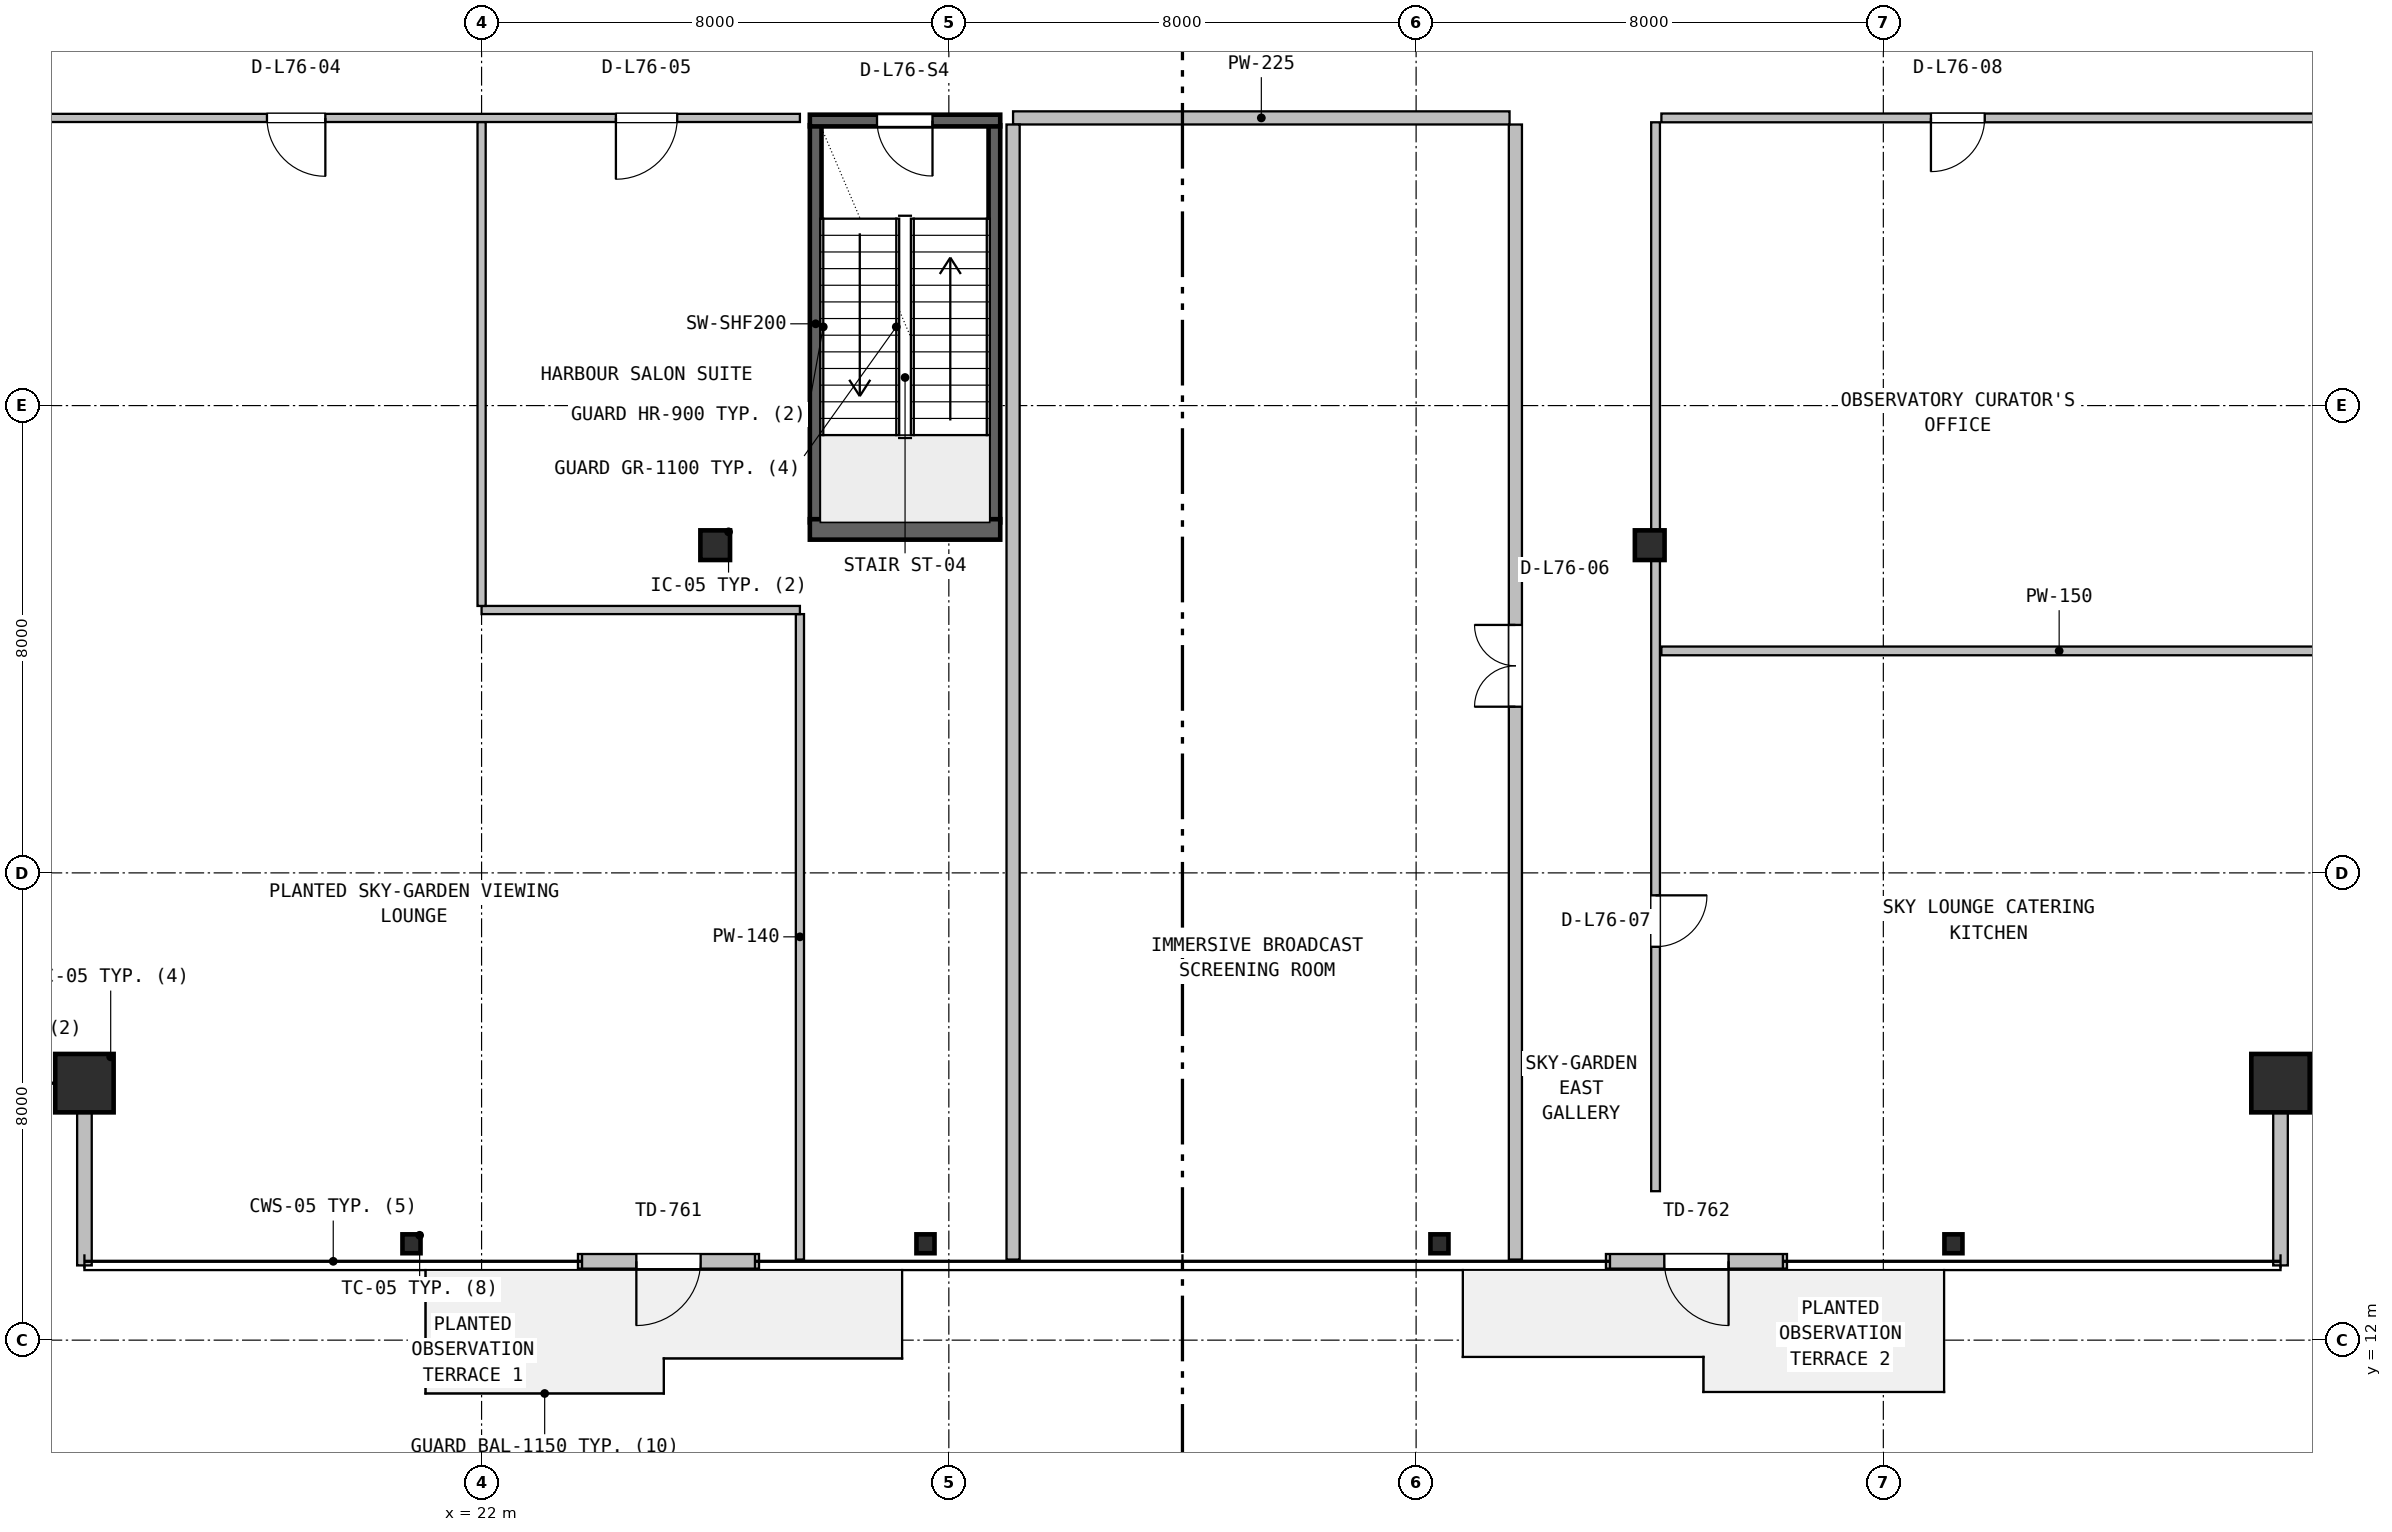
"""IFC4 building model, lengths in metres.
Left out: names, types, materials, properties, quantities, classifications, styles, units other than length and angle.
Written with IfcOpenShell. Run it as: python <this file> out.ifc"""

import sys

from ifc_helpers import new_model, si_unit, direction, frame, frame_2d, origin, origin_2d, place, context, subcontext, project, spatial, rectangle, hollow_rectangle, hollow_circle, i_section, extrude, source, transform, mapped, element, fill, save


model = new_model("IFC4")
c1 = context("Model", 3, precision=1e-05, world=origin(), true_north=direction((0.0, 1.0)))
c2 = subcontext(c1, "Body", "Model", "MODEL_VIEW")
j1 = project(units=[si_unit("LENGTHUNIT", "METRE"), si_unit("PLANEANGLEUNIT", "RADIAN")], contexts=[c1])
p1 = place(None, origin())
s1 = spatial("IfcSite", under=j1, at=p1, CompositionType="ELEMENT")
p2 = place(p1, origin())
s2 = spatial("IfcBuilding", under=s1, at=p2, CompositionType="ELEMENT")
p3 = place(p2, frame((0.0, 0.0, 305.0)))
s3 = spatial("IfcBuildingStorey", under=s2, at=p3, CompositionType="ELEMENT", Elevation=305.0)
m1 = source(origin(), c2, "Body", "SweptSolid", [
    extrude(hollow_rectangle(XDim=1.0, YDim=1.0, WallThickness=0.04, at=origin_2d()), origin(), (0.0, 0.0, 1.0), 4.8),
])
for number, where, z_axis, x_axis in (
    (1, (15.2, 16.4, 0.0), (0.0, 0.0, 1.0), (1.0, 0.0, 0.0)),
    (2, (52.8, 16.4, 0.0), (0.0, 0.0, 1.0), (1.0, 0.0, 0.0)),
):
    element("IfcColumn", number, at=place(p3, frame(where, z_axis=z_axis, x_axis=x_axis)), inside=s3, PredefinedType="COLUMN", context=c2, shape_type="MappedRepresentation", body=[
        mapped(m1, transform((0.0, 0.0, 0.0), x_axis=(1.0, 0.0, 0.0), y_axis=(0.0, 1.0, 0.0), z_axis=(0.0, 0.0, 1.0), scale=1.0)),
    ])
m2 = source(origin(), c2, "Body", "SweptSolid", [
    extrude(i_section(OverallWidth=0.309, OverallDepth=0.323, WebThickness=0.014, FlangeThickness=0.023, FilletRadius=0.015, at=origin_2d()), origin(), (0.0, 0.0, 1.0), 4.8),
])
for number, where, z_axis, x_axis in (
    (3, (20.8, 13.65, 0.0), (0.0, 0.0, 1.0), (1.0, 0.0, 0.0)),
    (4, (29.6, 13.65, 0.0), (0.0, 0.0, 1.0), (1.0, 0.0, 0.0)),
    (5, (38.4, 13.65, 0.0), (0.0, 0.0, 1.0), (1.0, 0.0, 0.0)),
    (6, (47.2, 13.65, 0.0), (0.0, 0.0, 1.0), (1.0, 0.0, 0.0)),
):
    element("IfcColumn", number, at=place(p3, frame(where, z_axis=z_axis, x_axis=x_axis)), inside=s3, PredefinedType="COLUMN", context=c2, shape_type="MappedRepresentation", body=[
        mapped(m2, transform((0.0, 0.0, 0.0), x_axis=(1.0, 0.0, 0.0), y_axis=(0.0, 1.0, 0.0), z_axis=(0.0, 0.0, 1.0), scale=1.0)),
    ])
m3 = source(origin(), c2, "Body", "SweptSolid", [
    extrude(hollow_circle(Radius=0.254, WallThickness=0.02, at=origin_2d()), origin(), (0.0, 0.0, 1.0), 4.8),
])
for number, where, z_axis, x_axis in (
    (7, (26.0, 25.61, 0.0), (0.0, 0.0, 1.0), (1.0, 0.0, 0.0)),
    (8, (42.0, 25.61, 0.0), (0.0, 0.0, 1.0), (1.0, 0.0, 0.0)),
):
    element("IfcColumn", number, at=place(p3, frame(where, z_axis=z_axis, x_axis=x_axis)), inside=s3, PredefinedType="COLUMN", context=c2, shape_type="MappedRepresentation", body=[
        mapped(m3, transform((0.0, 0.0, 0.0), x_axis=(1.0, 0.0, 0.0), y_axis=(0.0, 1.0, 0.0), z_axis=(0.0, 0.0, 1.0), scale=1.0)),
    ])
p4 = place(p3, frame((23.65, 13.35, 0.0), z_axis=(0.0, 0.0, 1.0), x_axis=(1.0, 0.0, 0.0)))
e9 = element("IfcWall", 9, at=p4, inside=s3, PredefinedType="SOLIDWALL", context=c2, shape_type="SweptSolid", body=[
    extrude(rectangle(XDim=3.1, YDim=0.25, at=frame_2d((1.55, 0.0))), origin(), (0.0, 0.0, 1.0), 4.5),
])
p5 = place(p4, frame((1.0, 0.0, 0.0)))
e10 = element("IfcOpeningElement", 10, at=p5, cuts=e9, PredefinedType="OPENING", context=c2, shape_type="SweptSolid", body=[
    extrude(rectangle(XDim=1.1, YDim=2.15, at=frame_2d((0.55, 1.075))), frame((0.0, 0.135, 0.0), z_axis=(0.0, -1.0, 0.0), x_axis=(1.0, 0.0, 0.0)), (0.0, 0.0, 1.0), 0.27),
])
p6 = place(p3, frame((41.25, 13.35, 0.0), z_axis=(0.0, 0.0, 1.0), x_axis=(1.0, 0.0, 0.0)))
e11 = element("IfcWall", 11, at=p6, inside=s3, PredefinedType="SOLIDWALL", context=c2, shape_type="SweptSolid", body=[
    extrude(rectangle(XDim=3.1, YDim=0.25, at=frame_2d((1.55, 0.0))), origin(), (0.0, 0.0, 1.0), 4.5),
])
p7 = place(p6, frame((1.0, 0.0, 0.0)))
e12 = element("IfcOpeningElement", 12, at=p7, cuts=e11, PredefinedType="OPENING", context=c2, shape_type="SweptSolid", body=[
    extrude(rectangle(XDim=1.1, YDim=2.15, at=frame_2d((0.55, 1.075))), frame((0.0, 0.135, 0.0), z_axis=(0.0, -1.0, 0.0), x_axis=(1.0, 0.0, 0.0)), (0.0, 0.0, 1.0), 0.27),
])
for number, where, z_axis, x_axis in (
    (13, (15.2, 13.28, 0.0), (0.0, 0.0, 1.0), (0.0, 1.0, 0.0)),
    (14, (52.8, 13.28, 0.0), (0.0, 0.0, 1.0), (0.0, 1.0, 0.0)),
):
    element("IfcWall", number, at=place(p3, frame(where, z_axis=z_axis, x_axis=x_axis)), inside=s3, PredefinedType="SOLIDWALL", context=c2, shape_type="SweptSolid", body=[
        extrude(rectangle(XDim=3.2, YDim=0.25, at=frame_2d((1.6, 0.0))), origin(), (0.0, 0.0, 1.0), 4.141),
    ])
for number, where, z_axis, x_axis in (
    (15, (27.72, 26.0, 0.0), (0.0, 0.0, 1.0), (0.0, 1.0, 0.0)),
    (16, (30.78, 26.0, 0.0), (0.0, 0.0, 1.0), (0.0, 1.0, 0.0)),
):
    element("IfcWall", number, at=place(p3, frame(where, z_axis=z_axis, x_axis=x_axis)), inside=s3, PredefinedType="SHEAR", context=c2, shape_type="SweptSolid", body=[
        extrude(rectangle(XDim=6.8, YDim=0.2, at=frame_2d((3.4, 0.0))), origin(), (0.0, 0.0, 1.0), 4.52),
    ])
p8 = place(p3, frame((27.62, 25.88, 0.0), z_axis=(0.0, 0.0, 1.0), x_axis=(1.0, 0.0, 0.0)))
e17 = element("IfcWall", 17, at=p8, inside=s3, PredefinedType="SHEAR", context=c2, shape_type="SweptSolid", body=[
    extrude(rectangle(XDim=3.26, YDim=0.35, at=frame_2d((1.63, 0.0))), origin(), (0.0, 0.0, 1.0), 4.52),
])
p9 = place(p3, frame((27.62, 32.88, 0.0), z_axis=(0.0, 0.0, 1.0), x_axis=(1.0, 0.0, 0.0)))
e18 = element("IfcWall", 18, at=p9, inside=s3, PredefinedType="SHEAR", context=c2, shape_type="SweptSolid", body=[
    extrude(rectangle(XDim=3.26, YDim=0.2, at=frame_2d((1.63, 0.0))), origin(), (0.0, 0.0, 1.0), 4.52),
])
p10 = place(p9, frame((1.15, 0.0, 0.0)))
e19 = element("IfcOpeningElement", 19, at=p10, cuts=e18, PredefinedType="OPENING", context=c2, shape_type="SweptSolid", body=[
    extrude(rectangle(XDim=0.95, YDim=2.1, at=frame_2d((0.475, 1.05))), frame((0.0, 0.11, 0.0), z_axis=(0.0, -1.0, 0.0), x_axis=(1.0, 0.0, 0.0)), (0.0, 0.0, 1.0), 0.22),
])
p11 = place(p3, frame((27.45, 13.38, 0.0), z_axis=(0.0, 0.0, 1.0), x_axis=(0.0, 1.0, 0.0)))
e20 = element("IfcWall", 20, at=p11, inside=s3, PredefinedType="PARTITIONING", context=c2, shape_type="SweptSolid", body=[
    extrude(rectangle(XDim=11.05, YDim=0.14, at=frame_2d((5.525, 0.0))), origin(), (0.0, 0.0, 1.0), 3.951),
])
p12 = place(p3, frame((22.0, 24.5, 0.0), z_axis=(0.0, 0.0, 1.0), x_axis=(1.0, 0.0, 0.0)))
e21 = element("IfcWall", 21, at=p12, inside=s3, PredefinedType="PARTITIONING", context=c2, shape_type="SweptSolid", body=[
    extrude(rectangle(XDim=5.45, YDim=0.14, at=frame_2d((2.725, 0.0))), origin(), (0.0, 0.0, 1.0), 3.951),
])
p13 = place(p3, frame((22.0, 24.57, 0.0), z_axis=(0.0, 0.0, 1.0), x_axis=(0.0, 1.0, 0.0)))
e22 = element("IfcWall", 22, at=p13, inside=s3, PredefinedType="PARTITIONING", context=c2, shape_type="SweptSolid", body=[
    extrude(rectangle(XDim=8.285, YDim=0.14, at=frame_2d((4.143, 0.0))), origin(), (0.0, 0.0, 1.0), 4.5),
])
p14 = place(p3, frame((12.18, 32.925, 0.0), z_axis=(0.0, 0.0, 1.0), x_axis=(1.0, 0.0, 0.0)))
e23 = element("IfcWall", 23, at=p14, inside=s3, PredefinedType="PARTITIONING", context=c2, shape_type="SweptSolid", body=[
    extrude(rectangle(XDim=15.27, YDim=0.14, at=frame_2d((7.635, 0.0))), origin(), (0.0, 0.0, 1.0), 3.951),
])
p15 = place(p14, frame((6.145, 0.0, 0.0)))
e24 = element("IfcOpeningElement", 24, at=p15, cuts=e23, PredefinedType="OPENING", context=c2, shape_type="SweptSolid", body=[
    extrude(rectangle(XDim=1.0, YDim=2.1, at=frame_2d((0.5, 1.05))), frame((0.0, 0.08, 0.0), z_axis=(0.0, -1.0, 0.0), x_axis=(1.0, 0.0, 0.0)), (0.0, 0.0, 1.0), 0.16),
])
p16 = place(p14, frame((12.12, 0.0, 0.0)))
e25 = element("IfcOpeningElement", 25, at=p16, cuts=e23, PredefinedType="OPENING", context=c2, shape_type="SweptSolid", body=[
    extrude(rectangle(XDim=1.05, YDim=2.1, at=frame_2d((0.525, 1.05))), frame((0.0, 0.08, 0.0), z_axis=(0.0, -1.0, 0.0), x_axis=(1.0, 0.0, 0.0)), (0.0, 0.0, 1.0), 0.16),
])
p17 = place(p3, frame((39.7, 13.38, 0.0), z_axis=(0.0, 0.0, 1.0), x_axis=(0.0, 1.0, 0.0)))
e26 = element("IfcWall", 26, at=p17, inside=s3, PredefinedType="PARTITIONING", context=c2, shape_type="SweptSolid", body=[
    extrude(rectangle(XDim=19.432, YDim=0.225, at=frame_2d((9.716, 0.0))), origin(), (0.0, 0.0, 1.0), 3.951),
])
p18 = place(p17, frame((9.465, 0.0, 0.0)))
e27 = element("IfcOpeningElement", 27, at=p18, cuts=e26, PredefinedType="OPENING", context=c2, shape_type="SweptSolid", body=[
    extrude(rectangle(XDim=1.4, YDim=2.12, at=frame_2d((0.7, 1.06))), frame((0.0, 0.123, 0.0), z_axis=(0.0, -1.0, 0.0), x_axis=(1.0, 0.0, 0.0)), (0.0, 0.0, 1.0), 0.245),
])
p19 = place(p3, frame((31.1, 32.925, 0.0), z_axis=(0.0, 0.0, 1.0), x_axis=(1.0, 0.0, 0.0)))
e28 = element("IfcWall", 28, at=p19, inside=s3, PredefinedType="PARTITIONING", context=c2, shape_type="SweptSolid", body=[
    extrude(rectangle(XDim=8.5, YDim=0.225, at=frame_2d((4.25, 0.0))), origin(), (0.0, 0.0, 1.0), 3.951),
])
p20 = place(p3, frame((31.1, 13.38, 0.0), z_axis=(0.0, 0.0, 1.0), x_axis=(0.0, 1.0, 0.0)))
e29 = element("IfcWall", 29, at=p20, inside=s3, PredefinedType="PARTITIONING", context=c2, shape_type="SweptSolid", body=[
    extrude(rectangle(XDim=19.432, YDim=0.225, at=frame_2d((9.716, 0.0))), origin(), (0.0, 0.0, 1.0), 3.951),
])
p21 = place(p3, frame((42.2, 23.8, 0.0), z_axis=(0.0, 0.0, 1.0), x_axis=(1.0, 0.0, 0.0)))
e30 = element("IfcWall", 30, at=p21, inside=s3, PredefinedType="PARTITIONING", context=c2, shape_type="SweptSolid", body=[
    extrude(rectangle(XDim=13.62, YDim=0.15, at=frame_2d((6.81, 0.0))), origin(), (0.0, 0.0, 1.0), 4.141),
])
p22 = place(p3, frame((42.1, 14.55, 0.0), z_axis=(0.0, 0.0, 1.0), x_axis=(0.0, 1.0, 0.0)))
e31 = element("IfcWall", 31, at=p22, inside=s3, PredefinedType="PARTITIONING", context=c2, shape_type="SweptSolid", body=[
    extrude(rectangle(XDim=18.3, YDim=0.15, at=frame_2d((9.15, 0.0))), origin(), (0.0, 0.0, 1.0), 3.951),
])
p23 = place(p22, frame((4.185, 0.0, 0.0)))
e32 = element("IfcOpeningElement", 32, at=p23, cuts=e31, PredefinedType="OPENING", context=c2, shape_type="SweptSolid", body=[
    extrude(rectangle(XDim=0.88, YDim=2.06, at=frame_2d((0.44, 1.03))), frame((0.0, 0.085, 0.0), z_axis=(0.0, -1.0, 0.0), x_axis=(1.0, 0.0, 0.0)), (0.0, 0.0, 1.0), 0.17),
])
p24 = place(p3, frame((42.2, 32.925, 0.0), z_axis=(0.0, 0.0, 1.0), x_axis=(1.0, 0.0, 0.0)))
e33 = element("IfcWall", 33, at=p24, inside=s3, PredefinedType="PARTITIONING", context=c2, shape_type="SweptSolid", body=[
    extrude(rectangle(XDim=13.62, YDim=0.15, at=frame_2d((6.81, 0.0))), origin(), (0.0, 0.0, 1.0), 3.951),
])
p25 = place(p24, frame((4.615, 0.0, 0.0)))
e34 = element("IfcOpeningElement", 34, at=p25, cuts=e33, PredefinedType="OPENING", context=c2, shape_type="SweptSolid", body=[
    extrude(rectangle(XDim=0.92, YDim=2.08, at=frame_2d((0.46, 1.04))), frame((0.0, 0.085, 0.0), z_axis=(0.0, -1.0, 0.0), x_axis=(1.0, 0.0, 0.0)), (0.0, 0.0, 1.0), 0.17),
])
m4 = source(origin(), c2, "Body", "SweptSolid", [
    extrude(rectangle(XDim=1.1, YDim=2.15, at=frame_2d((0.55, 1.075))), frame((0.0, 0.025, 0.0), z_axis=(0.0, -1.0, 0.0), x_axis=(1.0, 0.0, 0.0)), (0.0, 0.0, 1.0), 0.05),
])
p26 = place(p5, frame((1.1, 0.0, 0.0), z_axis=(0.0, 0.0, 1.0), x_axis=(-1.0, 0.0, 0.0)))
e35 = element("IfcDoor", 35, at=p26, inside=s3, OperationType="SINGLE_SWING_LEFT", PredefinedType="DOOR", context=c2, shape_type="MappedRepresentation", body=[
    mapped(m4, transform((0.0, 0.0, 0.0), x_axis=(1.0, 0.0, 0.0), y_axis=(0.0, 1.0, 0.0), z_axis=(0.0, 0.0, 1.0), scale=1.0)),
])
fill(e10, e35)
p27 = place(p7, frame((1.1, 0.0, 0.0), z_axis=(0.0, 0.0, 1.0), x_axis=(-1.0, 0.0, 0.0)))
e36 = element("IfcDoor", 36, at=p27, inside=s3, OperationType="SINGLE_SWING_RIGHT", PredefinedType="DOOR", context=c2, shape_type="MappedRepresentation", body=[
    mapped(m4, transform((0.0, 0.0, 0.0), x_axis=(1.0, 0.0, 0.0), y_axis=(0.0, 1.0, 0.0), z_axis=(0.0, 0.0, 1.0), scale=1.0)),
])
fill(e12, e36)
m5 = source(origin(), c2, "Body", "SweptSolid", [
    extrude(rectangle(XDim=0.95, YDim=2.1, at=frame_2d((0.475, 1.05))), frame((0.0, 0.025, 0.0), z_axis=(0.0, -1.0, 0.0), x_axis=(1.0, 0.0, 0.0)), (0.0, 0.0, 1.0), 0.05),
])
p28 = place(p10, frame((0.95, 0.0, 0.0), z_axis=(0.0, 0.0, 1.0), x_axis=(-1.0, 0.0, 0.0)))
e37 = element("IfcDoor", 37, at=p28, inside=s3, OperationType="SINGLE_SWING_RIGHT", PredefinedType="DOOR", context=c2, shape_type="MappedRepresentation", body=[
    mapped(m5, transform((0.0, 0.0, 0.0), x_axis=(1.0, 0.0, 0.0), y_axis=(0.0, 1.0, 0.0), z_axis=(0.0, 0.0, 1.0), scale=1.0)),
])
fill(e19, e37)
m6 = source(origin(), c2, "Body", "SweptSolid", [
    extrude(rectangle(XDim=1.0, YDim=2.1, at=frame_2d((0.5, 1.05))), frame((0.0, 0.025, 0.0), z_axis=(0.0, -1.0, 0.0), x_axis=(1.0, 0.0, 0.0)), (0.0, 0.0, 1.0), 0.05),
])
p29 = place(p15, frame((1.0, 0.0, 0.0), z_axis=(0.0, 0.0, 1.0), x_axis=(-1.0, 0.0, 0.0)))
e38 = element("IfcDoor", 38, at=p29, inside=s3, OperationType="SINGLE_SWING_RIGHT", PredefinedType="DOOR", context=c2, shape_type="MappedRepresentation", body=[
    mapped(m6, transform((0.0, 0.0, 0.0), x_axis=(1.0, 0.0, 0.0), y_axis=(0.0, 1.0, 0.0), z_axis=(0.0, 0.0, 1.0), scale=1.0)),
])
fill(e24, e38)
m7 = source(origin(), c2, "Body", "SweptSolid", [
    extrude(rectangle(XDim=1.05, YDim=2.1, at=frame_2d((0.525, 1.05))), frame((0.0, 0.025, 0.0), z_axis=(0.0, -1.0, 0.0), x_axis=(1.0, 0.0, 0.0)), (0.0, 0.0, 1.0), 0.05),
])
p30 = place(p16, frame((1.05, 0.0, 0.0), z_axis=(0.0, 0.0, 1.0), x_axis=(-1.0, 0.0, 0.0)))
e39 = element("IfcDoor", 39, at=p30, inside=s3, OperationType="SINGLE_SWING_LEFT", PredefinedType="DOOR", context=c2, shape_type="MappedRepresentation", body=[
    mapped(m7, transform((0.0, 0.0, 0.0), x_axis=(1.0, 0.0, 0.0), y_axis=(0.0, 1.0, 0.0), z_axis=(0.0, 0.0, 1.0), scale=1.0)),
])
fill(e25, e39)
m8 = source(origin(), c2, "Body", "SweptSolid", [
    extrude(rectangle(XDim=1.4, YDim=2.12, at=frame_2d((0.7, 1.06))), frame((0.0, 0.025, 0.0), z_axis=(0.0, -1.0, 0.0), x_axis=(1.0, 0.0, 0.0)), (0.0, 0.0, 1.0), 0.05),
])
p31 = place(p18, origin())
e40 = element("IfcDoor", 40, at=p31, inside=s3, OperationType="DOUBLE_DOOR_SINGLE_SWING", PredefinedType="DOOR", context=c2, shape_type="MappedRepresentation", body=[
    mapped(m8, transform((0.0, 0.0, 0.0), x_axis=(1.0, 0.0, 0.0), y_axis=(0.0, 1.0, 0.0), z_axis=(0.0, 0.0, 1.0), scale=1.0)),
])
fill(e27, e40)
m9 = source(origin(), c2, "Body", "SweptSolid", [
    extrude(rectangle(XDim=0.88, YDim=2.06, at=frame_2d((0.44, 1.03))), frame((0.0, 0.025, 0.0), z_axis=(0.0, -1.0, 0.0), x_axis=(1.0, 0.0, 0.0)), (0.0, 0.0, 1.0), 0.05),
])
p32 = place(p23, frame((0.88, 0.0, 0.0), z_axis=(0.0, 0.0, 1.0), x_axis=(-1.0, 0.0, 0.0)))
e41 = element("IfcDoor", 41, at=p32, inside=s3, OperationType="SINGLE_SWING_RIGHT", PredefinedType="DOOR", context=c2, shape_type="MappedRepresentation", body=[
    mapped(m9, transform((0.0, 0.0, 0.0), x_axis=(1.0, 0.0, 0.0), y_axis=(0.0, 1.0, 0.0), z_axis=(0.0, 0.0, 1.0), scale=1.0)),
])
fill(e32, e41)
m10 = source(origin(), c2, "Body", "SweptSolid", [
    extrude(rectangle(XDim=0.92, YDim=2.08, at=frame_2d((0.46, 1.04))), frame((0.0, 0.025, 0.0), z_axis=(0.0, -1.0, 0.0), x_axis=(1.0, 0.0, 0.0)), (0.0, 0.0, 1.0), 0.05),
])
p33 = place(p25, frame((0.92, 0.0, 0.0), z_axis=(0.0, 0.0, 1.0), x_axis=(-1.0, 0.0, 0.0)))
e42 = element("IfcDoor", 42, at=p33, inside=s3, OperationType="SINGLE_SWING_LEFT", PredefinedType="DOOR", context=c2, shape_type="MappedRepresentation", body=[
    mapped(m10, transform((0.0, 0.0, 0.0), x_axis=(1.0, 0.0, 0.0), y_axis=(0.0, 1.0, 0.0), z_axis=(0.0, 0.0, 1.0), scale=1.0)),
])
fill(e34, e42)
save(model, sys.argv[1])
